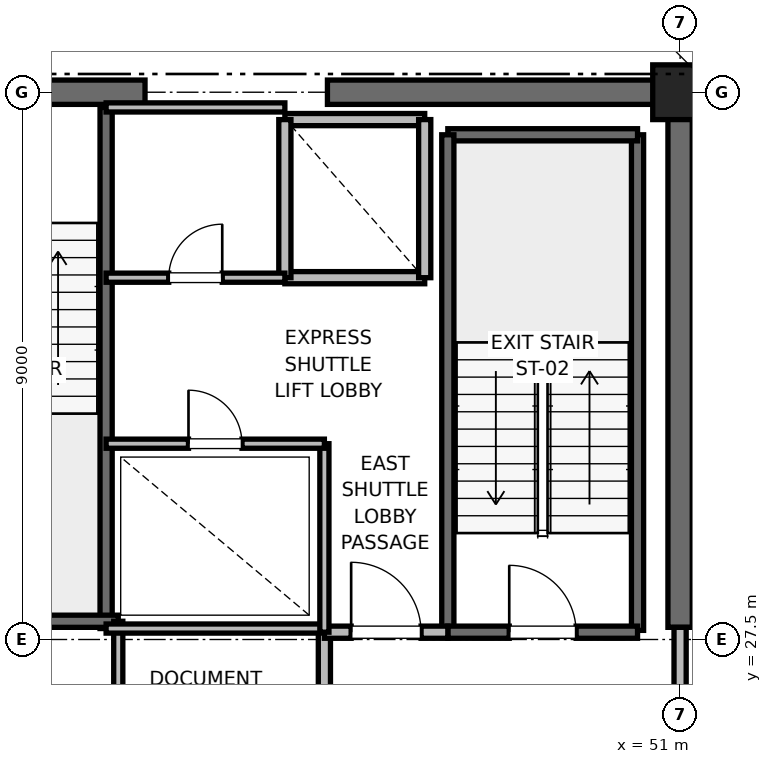
"""IFC4 building model, lengths in metres.
Left out: names, types, materials, properties, quantities, classifications, styles, units other than length and angle.
Written with IfcOpenShell. Run it as: python <this file> out.ifc"""

import sys

from ifc_helpers import new_model, si_unit, direction, frame, frame_2d, origin, origin_2d, place, context, subcontext, project, spatial, rectangle, extrude, element, fill, save


model = new_model("IFC4")
c1 = context("Model", 3, precision=1e-05, world=origin(), true_north=direction((0.0, 1.0)))
c2 = subcontext(c1, "Body", "Model", "MODEL_VIEW")
j1 = project(units=[si_unit("LENGTHUNIT", "METRE"), si_unit("PLANEANGLEUNIT", "RADIAN")], contexts=[c1])
p1 = place(None, origin())
s1 = spatial("IfcSite", under=j1, at=p1, CompositionType="ELEMENT")
p2 = place(p1, origin())
s2 = spatial("IfcBuilding", under=s1, at=p2, CompositionType="ELEMENT")
p3 = place(p2, frame((0.0, 0.0, 322.8)))
s3 = spatial("IfcBuildingStorey", under=s2, at=p3, CompositionType="ELEMENT", Elevation=322.8)
p4 = place(p3, frame((51.0, 36.5, 0.0), z_axis=(0.0, 0.0, 1.0), x_axis=(1.0, 0.0, 0.0)))
e1 = element("IfcColumn", 1, at=p4, inside=s3, PredefinedType="PILASTER", context=c2, shape_type="SweptSolid", body=[
    extrude(rectangle(XDim=0.9, YDim=0.9, at=origin_2d()), origin(), (0.0, 0.0, 1.0), 4.0),
])
p5 = place(p3, frame((37.8, 36.5, 0.0), z_axis=(0.0, 0.0, 1.0), x_axis=(1.0, 0.0, 0.0)))
e2 = element("IfcWall", 2, at=p5, inside=s3, PredefinedType="SHEAR", context=c2, shape_type="SweptSolid", body=[
    extrude(rectangle(XDim=4.4, YDim=0.4, at=frame_2d((2.2, 0.0))), origin(), (0.0, 0.0, 1.0), 3.785),
])
p6 = place(p5, frame((1.65, 0.0, 0.0)))
e3 = element("IfcOpeningElement", 3, at=p6, cuts=e2, PredefinedType="OPENING", context=c2, shape_type="SweptSolid", body=[
    extrude(rectangle(XDim=1.1, YDim=2.15, at=frame_2d((0.55, 1.075))), frame((0.0, 0.2, 0.0), z_axis=(0.0, -1.0, 0.0), x_axis=(1.0, 0.0, 0.0)), (0.0, 0.0, 1.0), 0.4),
])
p7 = place(p3, frame((45.2, 36.5, 0.0), z_axis=(0.0, 0.0, 1.0), x_axis=(1.0, 0.0, 0.0)))
e4 = element("IfcWall", 4, at=p7, inside=s3, PredefinedType="SHEAR", context=c2, shape_type="SweptSolid", body=[
    extrude(rectangle(XDim=5.8, YDim=0.4, at=frame_2d((2.9, 0.0))), origin(), (0.0, 0.0, 1.0), 3.785),
])
p8 = place(p3, frame((51.0, 27.7, 0.0), z_axis=(0.0, 0.0, 1.0), x_axis=(0.0, 1.0, 0.0)))
e5 = element("IfcWall", 5, at=p8, inside=s3, PredefinedType="SHEAR", context=c2, shape_type="SweptSolid", body=[
    extrude(rectangle(XDim=8.8, YDim=0.4, at=frame_2d((4.4, 0.0))), origin(), (0.0, 0.0, 1.0), 3.785),
])
p9 = place(p3, frame((50.3, 27.65, 0.0), z_axis=(0.0, 0.0, 1.0), x_axis=(0.0, 1.0, 0.0)))
e6 = element("IfcWall", 6, at=p9, inside=s3, PredefinedType="SOLIDWALL", context=c2, shape_type="SweptSolid", body=[
    extrude(rectangle(XDim=8.15, YDim=0.2, at=frame_2d((4.075, 0.0))), origin(), (0.0, 0.0, 1.0), 3.785),
])
p10 = place(p3, frame((47.18, 35.8, 0.0), z_axis=(0.0, 0.0, 1.0), x_axis=(1.0, 0.0, 0.0)))
e7 = element("IfcWall", 7, at=p10, inside=s3, PredefinedType="SOLIDWALL", context=c2, shape_type="SweptSolid", body=[
    extrude(rectangle(XDim=3.12, YDim=0.2, at=frame_2d((1.56, 0.0))), origin(), (0.0, 0.0, 1.0), 3.785),
])
p11 = place(p3, frame((47.18, 27.62, 0.0), z_axis=(0.0, 0.0, 1.0), x_axis=(0.0, 1.0, 0.0)))
e8 = element("IfcWall", 8, at=p11, inside=s3, PredefinedType="SOLIDWALL", context=c2, shape_type="SweptSolid", body=[
    extrude(rectangle(XDim=8.18, YDim=0.2, at=frame_2d((4.09, 0.0))), origin(), (0.0, 0.0, 1.0), 3.785),
])
p12 = place(p3, frame((47.18, 27.62, 0.0), z_axis=(0.0, 0.0, 1.0), x_axis=(1.0, 0.0, 0.0)))
e9 = element("IfcWall", 9, at=p12, inside=s3, PredefinedType="SOLIDWALL", context=c2, shape_type="SweptSolid", body=[
    extrude(rectangle(XDim=3.12, YDim=0.2, at=frame_2d((1.56, 0.0))), origin(), (0.0, 0.0, 1.0), 3.785),
])
p13 = place(p12, frame((1.01, 0.0, 0.0)))
e10 = element("IfcOpeningElement", 10, at=p13, cuts=e9, PredefinedType="OPENING", context=c2, shape_type="SweptSolid", body=[
    extrude(rectangle(XDim=1.1, YDim=2.15, at=frame_2d((0.55, 1.075))), frame((0.0, 0.1, 0.0), z_axis=(0.0, -1.0, 0.0), x_axis=(1.0, 0.0, 0.0)), (0.0, 0.0, 1.0), 0.2),
])
p14 = place(p3, frame((41.56, 27.68, 0.0), z_axis=(0.0, 0.0, 1.0), x_axis=(0.0, 1.0, 0.0)))
e11 = element("IfcWall", 11, at=p14, inside=s3, PredefinedType="SOLIDWALL", context=c2, shape_type="SweptSolid", body=[
    extrude(rectangle(XDim=8.57, YDim=0.2, at=frame_2d((4.285, 0.0))), origin(), (0.0, 0.0, 1.0), 3.785),
])
p15 = place(p3, frame((38.44, 27.8, 0.0), z_axis=(0.0, 0.0, 1.0), x_axis=(1.0, 0.0, 0.0)))
e12 = element("IfcWall", 12, at=p15, inside=s3, PredefinedType="SOLIDWALL", context=c2, shape_type="SweptSolid", body=[
    extrude(rectangle(XDim=3.32, YDim=0.2, at=frame_2d((1.66, 0.0))), origin(), (0.0, 0.0, 1.0), 3.785),
])
p16 = place(p3, frame((45.15, 24.25, 0.0), z_axis=(0.0, 0.0, 1.0), x_axis=(0.0, 1.0, 0.0)))
e13 = element("IfcWall", 13, at=p16, inside=s3, PredefinedType="PARTITIONING", context=c2, shape_type="SweptSolid", body=[
    extrude(rectangle(XDim=3.37, YDim=0.2, at=frame_2d((1.685, 0.0))), origin(), (0.0, 0.0, 1.0), 3.785),
])
p17 = place(p3, frame((45.15, 27.62, 0.0), z_axis=(0.0, 0.0, 1.0), x_axis=(1.0, 0.0, 0.0)))
e14 = element("IfcWall", 14, at=p17, inside=s3, PredefinedType="PARTITIONING", context=c2, shape_type="SweptSolid", body=[
    extrude(rectangle(XDim=2.03, YDim=0.2, at=frame_2d((1.015, 0.0))), origin(), (0.0, 0.0, 1.0), 3.785),
])
p18 = place(p17, frame((0.44, 0.0, 0.0)))
e15 = element("IfcOpeningElement", 15, at=p18, cuts=e14, PredefinedType="OPENING", context=c2, shape_type="SweptSolid", body=[
    extrude(rectangle(XDim=1.15, YDim=2.2, at=frame_2d((0.575, 1.1))), frame((0.0, 0.1, 0.0), z_axis=(0.0, -1.0, 0.0), x_axis=(1.0, 0.0, 0.0)), (0.0, 0.0, 1.0), 0.2),
])
p19 = place(p3, frame((51.0, 24.3, 0.0), z_axis=(0.0, 0.0, 1.0), x_axis=(0.0, 1.0, 0.0)))
e16 = element("IfcWall", 16, at=p19, inside=s3, PredefinedType="PARTITIONING", context=c2, shape_type="SweptSolid", body=[
    extrude(rectangle(XDim=3.4, YDim=0.2, at=frame_2d((1.7, 0.0))), origin(), (0.0, 0.0, 1.0), 2.865),
])
p20 = place(p19, frame((1.125, 0.0, 0.0)))
e17 = element("IfcOpeningElement", 17, at=p20, cuts=e16, PredefinedType="OPENING", context=c2, shape_type="SweptSolid", body=[
    extrude(rectangle(XDim=1.15, YDim=2.2, at=frame_2d((0.575, 1.1))), frame((0.0, 0.1, 0.0), z_axis=(0.0, -1.0, 0.0), x_axis=(1.0, 0.0, 0.0)), (0.0, 0.0, 1.0), 0.2),
])
p21 = place(p3, frame((44.5, 33.45, 0.0), z_axis=(0.0, 0.0, 1.0), x_axis=(1.0, 0.0, 0.0)))
e18 = element("IfcWall", 18, at=p21, inside=s3, PredefinedType="SOLIDWALL", context=c2, shape_type="SweptSolid", body=[
    extrude(rectangle(XDim=2.3, YDim=0.2, at=frame_2d((1.15, 0.0))), origin(), (0.0, 0.0, 1.0), 3.785),
])
p22 = place(p3, frame((46.8, 36.05, 0.0), z_axis=(0.0, 0.0, 1.0), x_axis=(-1.0, 0.0, 0.0)))
e19 = element("IfcWall", 19, at=p22, inside=s3, PredefinedType="SOLIDWALL", context=c2, shape_type="SweptSolid", body=[
    extrude(rectangle(XDim=2.3, YDim=0.2, at=frame_2d((1.15, 0.0))), origin(), (0.0, 0.0, 1.0), 2.865),
])
p23 = place(p3, frame((44.5, 36.05, 0.0), z_axis=(0.0, 0.0, 1.0), x_axis=(0.0, -1.0, 0.0)))
e20 = element("IfcWall", 20, at=p23, inside=s3, PredefinedType="SOLIDWALL", context=c2, shape_type="SweptSolid", body=[
    extrude(rectangle(XDim=2.6, YDim=0.2, at=frame_2d((1.3, 0.0))), origin(), (0.0, 0.0, 1.0), 2.865),
])
p24 = place(p3, frame((46.8, 33.45, 0.0), z_axis=(0.0, 0.0, 1.0), x_axis=(0.0, 1.0, 0.0)))
e21 = element("IfcWall", 21, at=p24, inside=s3, PredefinedType="SOLIDWALL", context=c2, shape_type="SweptSolid", body=[
    extrude(rectangle(XDim=2.6, YDim=0.2, at=frame_2d((1.3, 0.0))), origin(), (0.0, 0.0, 1.0), 3.785),
])
p25 = place(p3, frame((41.76, 23.8, 0.0), z_axis=(0.0, 0.0, 1.0), x_axis=(0.0, 1.0, 0.0)))
e22 = element("IfcWall", 22, at=p25, inside=s3, PredefinedType="PARTITIONING", context=c2, shape_type="SweptSolid", body=[
    extrude(rectangle(XDim=4.0, YDim=0.15, at=frame_2d((2.0, 0.0))), origin(), (0.0, 0.0, 1.0), 2.85),
])
p26 = place(p3, frame((41.56, 27.68, 0.0), z_axis=(0.0, 0.0, 1.0), x_axis=(1.0, 0.0, 0.0)))
e23 = element("IfcWall", 23, at=p26, inside=s3, PredefinedType="PARTITIONING", context=c2, shape_type="SweptSolid", body=[
    extrude(rectangle(XDim=3.59, YDim=0.15, at=frame_2d((1.795, 0.0))), origin(), (0.0, 0.0, 1.0), 2.85),
])
p27 = place(p3, frame((45.15, 27.62, 0.0), z_axis=(0.0, 0.0, 1.0), x_axis=(0.0, 1.0, 0.0)))
e24 = element("IfcWall", 24, at=p27, inside=s3, PredefinedType="PARTITIONING", context=c2, shape_type="SweptSolid", body=[
    extrude(rectangle(XDim=3.1, YDim=0.15, at=frame_2d((1.55, 0.0))), origin(), (0.0, 0.0, 1.0), 2.85),
])
p28 = place(p3, frame((41.56, 30.72, 0.0), z_axis=(0.0, 0.0, 1.0), x_axis=(1.0, 0.0, 0.0)))
e25 = element("IfcWall", 25, at=p28, inside=s3, PredefinedType="PARTITIONING", context=c2, shape_type="SweptSolid", body=[
    extrude(rectangle(XDim=3.59, YDim=0.15, at=frame_2d((1.795, 0.0))), origin(), (0.0, 0.0, 1.0), 2.85),
])
p29 = place(p28, frame((1.355, 0.0, 0.0)))
e26 = element("IfcOpeningElement", 26, at=p29, cuts=e25, PredefinedType="OPENING", context=c2, shape_type="SweptSolid", body=[
    extrude(rectangle(XDim=0.88, YDim=2.1, at=frame_2d((0.44, 1.05))), frame((0.0, 0.075, 0.0), z_axis=(0.0, -1.0, 0.0), x_axis=(1.0, 0.0, 0.0)), (0.0, 0.0, 1.0), 0.15),
])
p30 = place(p3, frame((41.56, 36.25, 0.0), z_axis=(0.0, 0.0, 1.0), x_axis=(1.0, 0.0, 0.0)))
e27 = element("IfcWall", 27, at=p30, inside=s3, PredefinedType="PARTITIONING", context=c2, shape_type="SweptSolid", body=[
    extrude(rectangle(XDim=2.94, YDim=0.15, at=frame_2d((1.47, 0.0))), origin(), (0.0, 0.0, 1.0), 2.85),
])
p31 = place(p3, frame((41.56, 33.45, 0.0), z_axis=(0.0, 0.0, 1.0), x_axis=(1.0, 0.0, 0.0)))
e28 = element("IfcWall", 28, at=p31, inside=s3, PredefinedType="PARTITIONING", context=c2, shape_type="SweptSolid", body=[
    extrude(rectangle(XDim=2.94, YDim=0.15, at=frame_2d((1.47, 0.0))), origin(), (0.0, 0.0, 1.0), 2.85),
])
p32 = place(p31, frame((1.03, 0.0, 0.0)))
e29 = element("IfcOpeningElement", 29, at=p32, cuts=e28, PredefinedType="OPENING", context=c2, shape_type="SweptSolid", body=[
    extrude(rectangle(XDim=0.88, YDim=2.1, at=frame_2d((0.44, 1.05))), frame((0.0, 0.075, 0.0), z_axis=(0.0, -1.0, 0.0), x_axis=(1.0, 0.0, 0.0)), (0.0, 0.0, 1.0), 0.15),
])
p33 = place(p13, origin())
e30 = element("IfcDoor", 30, at=p33, inside=s3, OperationType="SINGLE_SWING_LEFT", PredefinedType="DOOR", context=c2, shape_type="SweptSolid", body=[
    extrude(rectangle(XDim=1.1, YDim=2.15, at=frame_2d((0.55, 1.075))), frame((0.0, 0.025, 0.0), z_axis=(0.0, -1.0, 0.0), x_axis=(1.0, 0.0, 0.0)), (0.0, 0.0, 1.0), 0.05),
])
fill(e10, e30)
p34 = place(p18, origin())
e31 = element("IfcDoor", 31, at=p34, inside=s3, OperationType="SINGLE_SWING_LEFT", PredefinedType="DOOR", context=c2, shape_type="SweptSolid", body=[
    extrude(rectangle(XDim=1.15, YDim=2.2, at=frame_2d((0.575, 1.1))), frame((0.0, 0.025, 0.0), z_axis=(0.0, -1.0, 0.0), x_axis=(1.0, 0.0, 0.0)), (0.0, 0.0, 1.0), 0.05),
])
fill(e15, e31)
p35 = place(p29, origin())
e32 = element("IfcDoor", 32, at=p35, inside=s3, OperationType="SINGLE_SWING_LEFT", PredefinedType="DOOR", context=c2, shape_type="SweptSolid", body=[
    extrude(rectangle(XDim=0.88, YDim=2.1, at=frame_2d((0.44, 1.05))), frame((0.0, 0.025, 0.0), z_axis=(0.0, -1.0, 0.0), x_axis=(1.0, 0.0, 0.0)), (0.0, 0.0, 1.0), 0.05),
])
fill(e26, e32)
p36 = place(p32, origin())
e33 = element("IfcDoor", 33, at=p36, inside=s3, OperationType="SINGLE_SWING_RIGHT", PredefinedType="DOOR", context=c2, shape_type="SweptSolid", body=[
    extrude(rectangle(XDim=0.88, YDim=2.1, at=frame_2d((0.44, 1.05))), frame((0.0, 0.025, 0.0), z_axis=(0.0, -1.0, 0.0), x_axis=(1.0, 0.0, 0.0)), (0.0, 0.0, 1.0), 0.05),
])
fill(e29, e33)
save(model, sys.argv[1])
